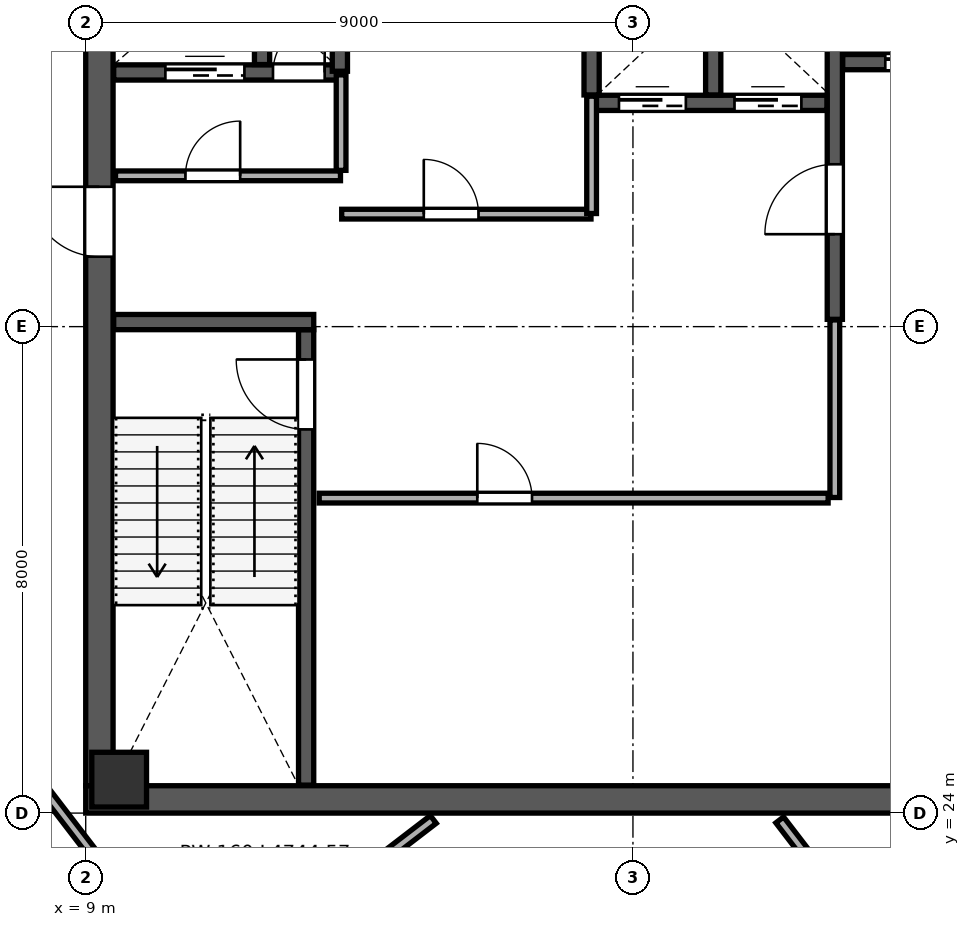
"""IFC4 building model, lengths in metres.
Left out: names, types, materials, properties, quantities, classifications, styles, units other than length and angle.
Written with IfcOpenShell. Run it as: python <this file> out.ifc"""

import sys

from ifc_helpers import new_model, si_unit, direction, frame, frame_2d, origin, origin_2d, place, context, subcontext, project, spatial, rectangle, extrude, source, transform, mapped, element, fill, save


model = new_model("IFC4")
c1 = context("Model", 3, precision=1e-05, world=origin(), true_north=direction((0.0, 1.0)))
c2 = subcontext(c1, "Body", "Model", "MODEL_VIEW")
j1 = project(units=[si_unit("LENGTHUNIT", "METRE"), si_unit("PLANEANGLEUNIT", "RADIAN")], contexts=[c1])
p1 = place(None, origin())
s1 = spatial("IfcSite", under=j1, at=p1, CompositionType="ELEMENT")
p2 = place(p1, origin())
s2 = spatial("IfcBuilding", under=s1, at=p2, CompositionType="ELEMENT")
p3 = place(p2, frame((0.0, 0.0, 279.4)))
s3 = spatial("IfcBuildingStorey", under=s2, at=p3, CompositionType="ELEMENT", Elevation=279.4)
m1 = source(origin(), c2, "Body", "SweptSolid", [
    extrude(rectangle(XDim=0.9, YDim=0.9, at=origin_2d()), origin(), (0.0, 0.0, 1.0), 4.199),
])
p4 = place(p3, frame((9.55, 24.55, 0.001), z_axis=(0.0, 0.0, 1.0), x_axis=(1.0, 0.0, 0.0)))
e1 = element("IfcColumn", 1, at=p4, inside=s3, PredefinedType="COLUMN", context=c2, shape_type="MappedRepresentation", body=[
    mapped(m1, transform((0.0, 0.0, 0.0), scale=1.0)),
])
p5 = place(p3, frame((9.225, 24.45, 0.0), z_axis=(0.0, 0.0, 1.0), x_axis=(0.0, 1.0, 0.0)))
e2 = element("IfcWall", 2, at=p5, inside=s3, PredefinedType="SHEAR", context=c2, shape_type="SweptSolid", body=[
    extrude(rectangle(XDim=15.1, YDim=0.45, at=frame_2d((7.55, 0.0))), origin(), (0.0, 0.0, 1.0), 3.96),
])
p6 = place(p5, frame((8.7, 0.0, 0.0)))
e3 = element("IfcOpeningElement", 3, at=p6, cuts=e2, PredefinedType="OPENING", context=c2, shape_type="SweptSolid", body=[
    extrude(rectangle(XDim=1.15, YDim=2.2, at=frame_2d((0.575, 1.1))), frame((0.0, 0.235, 0.0), z_axis=(0.0, -1.0, 0.0), x_axis=(1.0, 0.0, 0.0)), (0.0, 0.0, 1.0), 0.47),
])
p7 = place(p3, frame((9.0, 24.225, 0.0), z_axis=(0.0, 0.0, 1.0), x_axis=(1.0, 0.0, 0.0)))
e4 = element("IfcWall", 4, at=p7, inside=s3, PredefinedType="SHEAR", context=c2, shape_type="SweptSolid", body=[
    extrude(rectangle(XDim=18.0, YDim=0.45, at=frame_2d((9.0, 0.0))), origin(), (0.0, 0.0, 1.0), 3.96),
])
p8 = place(p3, frame((12.625, 24.46, 0.0), z_axis=(0.0, 0.0, 1.0), x_axis=(0.0, 1.0, 0.0)))
e5 = element("IfcWall", 5, at=p8, inside=s3, PredefinedType="SHEAR", context=c2, shape_type="SweptSolid", body=[
    extrude(rectangle(XDim=7.49, YDim=0.25, at=frame_2d((3.745, 0.0))), origin(), (0.0, 0.0, 1.0), 3.96),
])
p9 = place(p8, frame((5.85, 0.0, 0.0)))
e6 = element("IfcOpeningElement", 6, at=p9, cuts=e5, PredefinedType="OPENING", context=c2, shape_type="SweptSolid", body=[
    extrude(rectangle(XDim=1.15, YDim=2.2, at=frame_2d((0.575, 1.1))), frame((0.0, 0.135, 0.0), z_axis=(0.0, -1.0, 0.0), x_axis=(1.0, 0.0, 0.0)), (0.0, 0.0, 1.0), 0.27),
])
p10 = place(p3, frame((9.46, 32.075, 0.0), z_axis=(0.0, 0.0, 1.0), x_axis=(1.0, 0.0, 0.0)))
e7 = element("IfcWall", 7, at=p10, inside=s3, PredefinedType="SHEAR", context=c2, shape_type="SweptSolid", body=[
    extrude(rectangle(XDim=3.29, YDim=0.25, at=frame_2d((1.645, 0.0))), origin(), (0.0, 0.0, 1.0), 3.96),
])
p11 = place(p3, frame((21.32, 32.12, 0.0), z_axis=(0.0, 0.0, 1.0), x_axis=(0.0, 1.0, 0.0)))
e8 = element("IfcWall", 8, at=p11, inside=s3, PredefinedType="SHEAR", context=c2, shape_type="SweptSolid", body=[
    extrude(rectangle(XDim=7.42, YDim=0.25, at=frame_2d((3.71, 0.0))), origin(), (0.0, 0.0, 1.0), 3.96),
])
p12 = place(p11, frame((1.4, 0.0, 0.0)))
e9 = element("IfcOpeningElement", 9, at=p12, cuts=e8, PredefinedType="OPENING", context=c2, shape_type="SweptSolid", body=[
    extrude(rectangle(XDim=1.15, YDim=2.2, at=frame_2d((0.575, 1.1))), frame((0.0, 0.135, 0.0), z_axis=(0.0, -1.0, 0.0), x_axis=(1.0, 0.0, 0.0)), (0.0, 0.0, 1.0), 0.27),
])
p13 = place(p3, frame((9.46, 36.18, 0.0), z_axis=(0.0, 0.0, 1.0), x_axis=(1.0, 0.0, 0.0)))
e10 = element("IfcWall", 10, at=p13, inside=s3, PredefinedType="SHEAR", context=c2, shape_type="SweptSolid", body=[
    extrude(rectangle(XDim=3.79, YDim=0.25, at=frame_2d((1.895, 0.0))), origin(), (0.0, 0.0, 1.0), 3.96),
])
p14 = place(p13, frame((2.62, 0.0, 0.0)))
e11 = element("IfcOpeningElement", 11, at=p14, cuts=e10, PredefinedType="OPENING", context=c2, shape_type="SweptSolid", body=[
    extrude(rectangle(XDim=0.85, YDim=2.1, at=frame_2d((0.425, 1.05))), frame((0.0, 0.135, 0.0), z_axis=(0.0, -1.0, 0.0), x_axis=(1.0, 0.0, 0.0)), (0.0, 0.0, 1.0), 0.27),
])
p15 = place(p13, frame((0.85, 0.0, 0.0)))
e12 = element("IfcOpeningElement", 12, at=p15, cuts=e10, PredefinedType="OPENING", context=c2, shape_type="SweptSolid", body=[
    extrude(rectangle(XDim=1.3, YDim=2.25, at=frame_2d((0.65, 1.125))), frame((0.0, 0.135, 0.0), z_axis=(0.0, -1.0, 0.0), x_axis=(1.0, 0.0, 0.0)), (0.0, 0.0, 1.0), 0.27),
])
p16 = place(p3, frame((11.9, 36.31, 0.0), z_axis=(0.0, 0.0, 1.0), x_axis=(0.0, 1.0, 0.0)))
e13 = element("IfcWall", 13, at=p16, inside=s3, PredefinedType="SHEAR", context=c2, shape_type="SweptSolid", body=[
    extrude(rectangle(XDim=3.23, YDim=0.25, at=frame_2d((1.615, 0.0))), origin(), (0.0, 0.0, 1.0), 3.96),
])
p17 = place(p3, frame((21.45, 36.35, 0.0), z_axis=(0.0, 0.0, 1.0), x_axis=(1.0, 0.0, 0.0)))
e14 = element("IfcWall", 14, at=p17, inside=s3, PredefinedType="SHEAR", context=c2, shape_type="SweptSolid", body=[
    extrude(rectangle(XDim=5.09, YDim=0.25, at=frame_2d((2.545, 0.0))), origin(), (0.0, 0.0, 1.0), 3.96),
])
p18 = place(p17, frame((0.7, 0.0, 0.0)))
e15 = element("IfcOpeningElement", 15, at=p18, cuts=e14, PredefinedType="OPENING", context=c2, shape_type="SweptSolid", body=[
    extrude(rectangle(XDim=1.2, YDim=2.2, at=frame_2d((0.6, 1.1))), frame((0.0, 0.135, 0.0), z_axis=(0.0, -1.0, 0.0), x_axis=(1.0, 0.0, 0.0)), (0.0, 0.0, 1.0), 0.27),
])
p19 = place(p17, frame((3.25, 0.0, 0.0)))
e16 = element("IfcOpeningElement", 16, at=p19, cuts=e14, PredefinedType="OPENING", context=c2, shape_type="SweptSolid", body=[
    extrude(rectangle(XDim=1.2, YDim=2.2, at=frame_2d((0.6, 1.1))), frame((0.0, 0.135, 0.0), z_axis=(0.0, -1.0, 0.0), x_axis=(1.0, 0.0, 0.0)), (0.0, 0.0, 1.0), 0.27),
])
p20 = place(p3, frame((13.18, 36.2, 0.0), z_axis=(0.0, 0.0, 1.0), x_axis=(0.0, 1.0, 0.0)))
e17 = element("IfcWall", 17, at=p20, inside=s3, PredefinedType="SHEAR", context=c2, shape_type="SweptSolid", body=[
    extrude(rectangle(XDim=3.34, YDim=0.25, at=frame_2d((1.67, 0.0))), origin(), (0.0, 0.0, 1.0), 3.96),
])
p21 = place(p3, frame((17.32, 35.68, 0.0), z_axis=(0.0, 0.0, 1.0), x_axis=(1.0, 0.0, 0.0)))
e18 = element("IfcWall", 18, at=p21, inside=s3, PredefinedType="SHEAR", context=c2, shape_type="SweptSolid", body=[
    extrude(rectangle(XDim=3.87, YDim=0.25, at=frame_2d((1.935, 0.0))), origin(), (0.0, 0.0, 1.0), 3.96),
])
p22 = place(p21, frame((0.45, 0.0, 0.0)))
e19 = element("IfcOpeningElement", 19, at=p22, cuts=e18, PredefinedType="OPENING", context=c2, shape_type="SweptSolid", body=[
    extrude(rectangle(XDim=1.1, YDim=2.2, at=frame_2d((0.55, 1.1))), frame((0.0, 0.135, 0.0), z_axis=(0.0, -1.0, 0.0), x_axis=(1.0, 0.0, 0.0)), (0.0, 0.0, 1.0), 0.27),
])
p23 = place(p21, frame((2.35, 0.0, 0.0)))
e20 = element("IfcOpeningElement", 20, at=p23, cuts=e18, PredefinedType="OPENING", context=c2, shape_type="SweptSolid", body=[
    extrude(rectangle(XDim=1.1, YDim=2.2, at=frame_2d((0.55, 1.1))), frame((0.0, 0.135, 0.0), z_axis=(0.0, -1.0, 0.0), x_axis=(1.0, 0.0, 0.0)), (0.0, 0.0, 1.0), 0.27),
])
for number, where, z_axis, x_axis in (
    (21, (17.32, 35.81, 0.0), (0.0, 0.0, 1.0), (0.0, 1.0, 0.0)),
    (22, (19.32, 35.81, 0.0), (0.0, 0.0, 1.0), (0.0, 1.0, 0.0)),
):
    element("IfcWall", number, at=place(p3, frame(where, z_axis=z_axis, x_axis=x_axis)), inside=s3, PredefinedType="SHEAR", context=c2, shape_type="SweptSolid", body=[
        extrude(rectangle(XDim=3.73, YDim=0.25, at=frame_2d((1.865, 0.0))), origin(), (0.0, 0.0, 1.0), 3.96),
    ])
p24 = place(p3, frame((9.49, 34.48, 0.0), z_axis=(0.0, 0.0, 1.0), x_axis=(1.0, 0.0, 0.0)))
e23 = element("IfcWall", 23, at=p24, inside=s3, PredefinedType="PARTITIONING", context=c2, shape_type="SweptSolid", body=[
    extrude(rectangle(XDim=3.7, YDim=0.16, at=frame_2d((1.85, 0.0))), origin(), (0.0, 0.0, 1.0), 3.96),
])
p25 = place(p24, frame((1.15, 0.0, 0.0)))
e24 = element("IfcOpeningElement", 24, at=p25, cuts=e23, PredefinedType="OPENING", context=c2, shape_type="SweptSolid", body=[
    extrude(rectangle(XDim=0.9, YDim=2.15, at=frame_2d((0.45, 1.075))), frame((0.0, 0.09, 0.0), z_axis=(0.0, -1.0, 0.0), x_axis=(1.0, 0.0, 0.0)), (0.0, 0.0, 1.0), 0.18),
])
p26 = place(p3, frame((13.2, 34.57, 0.0), z_axis=(0.0, 0.0, 1.0), x_axis=(0.0, 1.0, 0.0)))
e25 = element("IfcWall", 25, at=p26, inside=s3, PredefinedType="PARTITIONING", context=c2, shape_type="SweptSolid", body=[
    extrude(rectangle(XDim=1.57, YDim=0.16, at=frame_2d((0.785, 0.0))), origin(), (0.0, 0.0, 1.0), 3.96),
])
p27 = place(p3, frame((13.21, 33.85, 0.0), z_axis=(0.0, 0.0, 1.0), x_axis=(1.0, 0.0, 0.0)))
e26 = element("IfcWall", 26, at=p27, inside=s3, PredefinedType="PARTITIONING", context=c2, shape_type="SweptSolid", body=[
    extrude(rectangle(XDim=4.1, YDim=0.16, at=frame_2d((2.05, 0.0))), origin(), (0.0, 0.0, 1.0), 3.96),
])
p28 = place(p27, frame((1.35, 0.0, 0.0)))
e27 = element("IfcOpeningElement", 27, at=p28, cuts=e26, PredefinedType="OPENING", context=c2, shape_type="SweptSolid", body=[
    extrude(rectangle(XDim=0.9, YDim=2.15, at=frame_2d((0.45, 1.075))), frame((0.0, 0.09, 0.0), z_axis=(0.0, -1.0, 0.0), x_axis=(1.0, 0.0, 0.0)), (0.0, 0.0, 1.0), 0.18),
])
p29 = place(p3, frame((17.32, 33.86, 0.0), z_axis=(0.0, 0.0, 1.0), x_axis=(0.0, 1.0, 0.0)))
e28 = element("IfcWall", 28, at=p29, inside=s3, PredefinedType="PARTITIONING", context=c2, shape_type="SweptSolid", body=[
    extrude(rectangle(XDim=1.93, YDim=0.16, at=frame_2d((0.965, 0.0))), origin(), (0.0, 0.0, 1.0), 3.96),
])
p30 = place(p3, frame((12.84, 29.18, 0.0), z_axis=(0.0, 0.0, 1.0), x_axis=(1.0, 0.0, 0.0)))
e29 = element("IfcWall", 29, at=p30, inside=s3, PredefinedType="PARTITIONING", context=c2, shape_type="SweptSolid", body=[
    extrude(rectangle(XDim=8.37, YDim=0.16, at=frame_2d((4.185, 0.0))), origin(), (0.0, 0.0, 1.0), 3.96),
])
p31 = place(p30, frame((2.6, 0.0, 0.0)))
e30 = element("IfcOpeningElement", 30, at=p31, cuts=e29, PredefinedType="OPENING", context=c2, shape_type="SweptSolid", body=[
    extrude(rectangle(XDim=0.9, YDim=2.15, at=frame_2d((0.45, 1.075))), frame((0.0, 0.09, 0.0), z_axis=(0.0, -1.0, 0.0), x_axis=(1.0, 0.0, 0.0)), (0.0, 0.0, 1.0), 0.18),
])
p32 = place(p3, frame((21.32, 29.19, 0.0), z_axis=(0.0, 0.0, 1.0), x_axis=(0.0, 1.0, 0.0)))
e31 = element("IfcWall", 31, at=p32, inside=s3, PredefinedType="PARTITIONING", context=c2, shape_type="SweptSolid", body=[
    extrude(rectangle(XDim=2.92, YDim=0.16, at=frame_2d((1.46, 0.0))), origin(), (0.0, 0.0, 1.0), 3.96),
])
p33 = place(p3, frame((3.853, 30.194, 0.0), z_axis=(0.0, 0.0, 1.0), x_axis=(0.608748677634, -0.793363124603, 0.0)))
e32 = element("IfcWall", 32, at=p33, inside=s3, PredefinedType="PARTITIONING", context=c2, shape_type="SweptSolid", body=[
    extrude(rectangle(XDim=11.57, YDim=0.16, at=frame_2d((5.785, 0.0))), origin(), (0.0, 0.0, 1.0), 3.96),
])
p34 = place(p33, frame((1.15, 0.0, 0.0)))
e33 = element("IfcOpeningElement", 33, at=p34, cuts=e32, PredefinedType="OPENING", context=c2, shape_type="SweptSolid", body=[
    extrude(rectangle(XDim=0.95, YDim=2.15, at=frame_2d((0.475, 1.075))), frame((0.0, 0.09, 0.0), z_axis=(0.0, -1.0, 0.0), x_axis=(1.0, 0.0, 0.0)), (0.0, 0.0, 1.0), 0.18),
])
p35 = place(p3, frame((10.952, 21.007, 0.0), z_axis=(0.0, 0.0, 1.0), x_axis=(0.793369431695, 0.608740457709, 0.0)))
e34 = element("IfcWall", 34, at=p35, inside=s3, PredefinedType="PARTITIONING", context=c2, shape_type="SweptSolid", body=[
    extrude(rectangle(XDim=4.745, YDim=0.16, at=frame_2d((2.372, 0.0))), origin(), (0.0, 0.0, 1.0), 3.96),
])
p36 = place(p3, frame((20.414, 23.888, 0.0), z_axis=(0.0, 0.0, 1.0), x_axis=(0.608740736079, -0.793369218106, 0.0)))
e35 = element("IfcWall", 35, at=p36, inside=s3, PredefinedType="PARTITIONING", context=c2, shape_type="SweptSolid", body=[
    extrude(rectangle(XDim=5.585, YDim=0.16, at=frame_2d((2.793, 0.0))), origin(), (0.0, 0.0, 1.0), 3.96),
])
p37 = place(p3, frame((20.518, 50.922, 0.0), z_axis=(0.0, 0.0, 1.0), x_axis=(0.608759693778, -0.793354671778, 0.0)))
e36 = element("IfcWall", 36, at=p37, inside=s3, PredefinedType="PARTITIONING", context=c2, shape_type="SweptSolid", body=[
    extrude(rectangle(XDim=26.97, YDim=0.135, at=frame_2d((13.485, 0.0))), origin(), (0.0, 0.0, 1.0), 3.96),
])
p38 = place(p37, frame((5.4, 0.0, 0.0)))
e37 = element("IfcOpeningElement", 37, at=p38, cuts=e36, PredefinedType="OPENING", context=c2, shape_type="SweptSolid", body=[
    extrude(rectangle(XDim=0.95, YDim=2.15, at=frame_2d((0.475, 1.075))), frame((0.0, 0.078, 0.0), z_axis=(0.0, -1.0, 0.0), x_axis=(1.0, 0.0, 0.0)), (0.0, 0.0, 1.0), 0.155),
])
p39 = place(p3, frame((1.519, 35.764, 0.0), z_axis=(0.0, 0.0, 1.0), x_axis=(0.793353184068, 0.608761632602, 0.0)))
e38 = element("IfcWall", 38, at=p39, inside=s3, PredefinedType="PARTITIONING", context=c2, shape_type="SweptSolid", body=[
    extrude(rectangle(XDim=27.572, YDim=0.1, at=frame_2d((13.786, 0.0))), origin(), (0.0, 0.0, 1.0), 3.96),
])
m2 = source(origin(), c2, "Body", "SweptSolid", [
    extrude(rectangle(XDim=1.15, YDim=2.2, at=frame_2d((0.575, 1.1))), frame((0.0, 0.025, 0.0), z_axis=(0.0, -1.0, 0.0), x_axis=(1.0, 0.0, 0.0)), (0.0, 0.0, 1.0), 0.05),
])
p40 = place(p9, origin())
e39 = element("IfcDoor", 39, at=p40, inside=s3, OperationType="SINGLE_SWING_RIGHT", PredefinedType="DOOR", context=c2, shape_type="MappedRepresentation", body=[
    mapped(m2, transform((0.0, 0.0, 0.0), scale=1.0)),
])
fill(e6, e39)
m3 = source(origin(), c2, "Body", "SweptSolid", [
    extrude(rectangle(XDim=1.15, YDim=2.2, at=frame_2d((0.575, 1.1))), frame((0.0, 0.025, 0.0), z_axis=(0.0, -1.0, 0.0), x_axis=(1.0, 0.0, 0.0)), (0.0, 0.0, 1.0), 0.05),
])
p41 = place(p12, origin())
e40 = element("IfcDoor", 40, at=p41, inside=s3, OperationType="SINGLE_SWING_LEFT", PredefinedType="DOOR", context=c2, shape_type="MappedRepresentation", body=[
    mapped(m3, transform((0.0, 0.0, 0.0), scale=1.0)),
])
fill(e9, e40)
p42 = place(p6, origin())
e41 = element("IfcDoor", 41, at=p42, inside=s3, OperationType="SINGLE_SWING_RIGHT", PredefinedType="DOOR", context=c2, shape_type="MappedRepresentation", body=[
    mapped(m3, transform((0.0, 0.0, 0.0), scale=1.0)),
])
fill(e3, e41)
m4 = source(origin(), c2, "Body", "SweptSolid", [
    extrude(rectangle(XDim=0.85, YDim=2.1, at=frame_2d((0.425, 1.05))), frame((0.0, 0.025, 0.0), z_axis=(0.0, -1.0, 0.0), x_axis=(1.0, 0.0, 0.0)), (0.0, 0.0, 1.0), 0.05),
])
p43 = place(p14, origin())
e42 = element("IfcDoor", 42, at=p43, inside=s3, OperationType="SINGLE_SWING_RIGHT", PredefinedType="DOOR", context=c2, shape_type="MappedRepresentation", body=[
    mapped(m4, transform((0.0, 0.0, 0.0), scale=1.0)),
])
fill(e11, e42)
m5 = source(origin(), c2, "Body", "SweptSolid", [
    extrude(rectangle(XDim=1.1, YDim=2.2, at=frame_2d((0.55, 1.1))), frame((0.0, 0.025, 0.0), z_axis=(0.0, -1.0, 0.0), x_axis=(1.0, 0.0, 0.0)), (0.0, 0.0, 1.0), 0.05),
])
p44 = place(p22, origin())
e43 = element("IfcDoor", 43, at=p44, inside=s3, OperationType="SLIDING_TO_LEFT", PredefinedType="DOOR", context=c2, shape_type="MappedRepresentation", body=[
    mapped(m5, transform((0.0, 0.0, 0.0), scale=1.0)),
])
fill(e19, e43)
p45 = place(p23, origin())
e44 = element("IfcDoor", 44, at=p45, inside=s3, OperationType="SLIDING_TO_RIGHT", PredefinedType="DOOR", context=c2, shape_type="MappedRepresentation", body=[
    mapped(m5, transform((0.0, 0.0, 0.0), scale=1.0)),
])
fill(e20, e44)
m6 = source(origin(), c2, "Body", "SweptSolid", [
    extrude(rectangle(XDim=1.2, YDim=2.2, at=frame_2d((0.6, 1.1))), frame((0.0, 0.025, 0.0), z_axis=(0.0, -1.0, 0.0), x_axis=(1.0, 0.0, 0.0)), (0.0, 0.0, 1.0), 0.05),
])
p46 = place(p18, origin())
e45 = element("IfcDoor", 45, at=p46, inside=s3, OperationType="SLIDING_TO_LEFT", PredefinedType="DOOR", context=c2, shape_type="MappedRepresentation", body=[
    mapped(m6, transform((0.0, 0.0, 0.0), scale=1.0)),
])
fill(e15, e45)
m7 = source(origin(), c2, "Body", "SweptSolid", [
    extrude(rectangle(XDim=1.3, YDim=2.25, at=frame_2d((0.65, 1.125))), frame((0.0, 0.025, 0.0), z_axis=(0.0, -1.0, 0.0), x_axis=(1.0, 0.0, 0.0)), (0.0, 0.0, 1.0), 0.05),
])
p47 = place(p15, origin())
e46 = element("IfcDoor", 46, at=p47, inside=s3, OperationType="SLIDING_TO_LEFT", PredefinedType="DOOR", context=c2, shape_type="MappedRepresentation", body=[
    mapped(m7, transform((0.0, 0.0, 0.0), scale=1.0)),
])
fill(e12, e46)
m8 = source(origin(), c2, "Body", "SweptSolid", [
    extrude(rectangle(XDim=0.9, YDim=2.15, at=frame_2d((0.45, 1.075))), frame((0.0, 0.025, 0.0), z_axis=(0.0, -1.0, 0.0), x_axis=(1.0, 0.0, 0.0)), (0.0, 0.0, 1.0), 0.05),
])
p48 = place(p25, origin())
e47 = element("IfcDoor", 47, at=p48, inside=s3, OperationType="SINGLE_SWING_RIGHT", PredefinedType="DOOR", context=c2, shape_type="MappedRepresentation", body=[
    mapped(m8, transform((0.0, 0.0, 0.0), scale=1.0)),
])
fill(e24, e47)
p49 = place(p28, origin())
e48 = element("IfcDoor", 48, at=p49, inside=s3, OperationType="SINGLE_SWING_LEFT", PredefinedType="DOOR", context=c2, shape_type="MappedRepresentation", body=[
    mapped(m8, transform((0.0, 0.0, 0.0), scale=1.0)),
])
fill(e27, e48)
p50 = place(p31, origin())
e49 = element("IfcDoor", 49, at=p50, inside=s3, OperationType="SINGLE_SWING_LEFT", PredefinedType="DOOR", context=c2, shape_type="MappedRepresentation", body=[
    mapped(m8, transform((0.0, 0.0, 0.0), scale=1.0)),
])
fill(e30, e49)
save(model, sys.argv[1])
